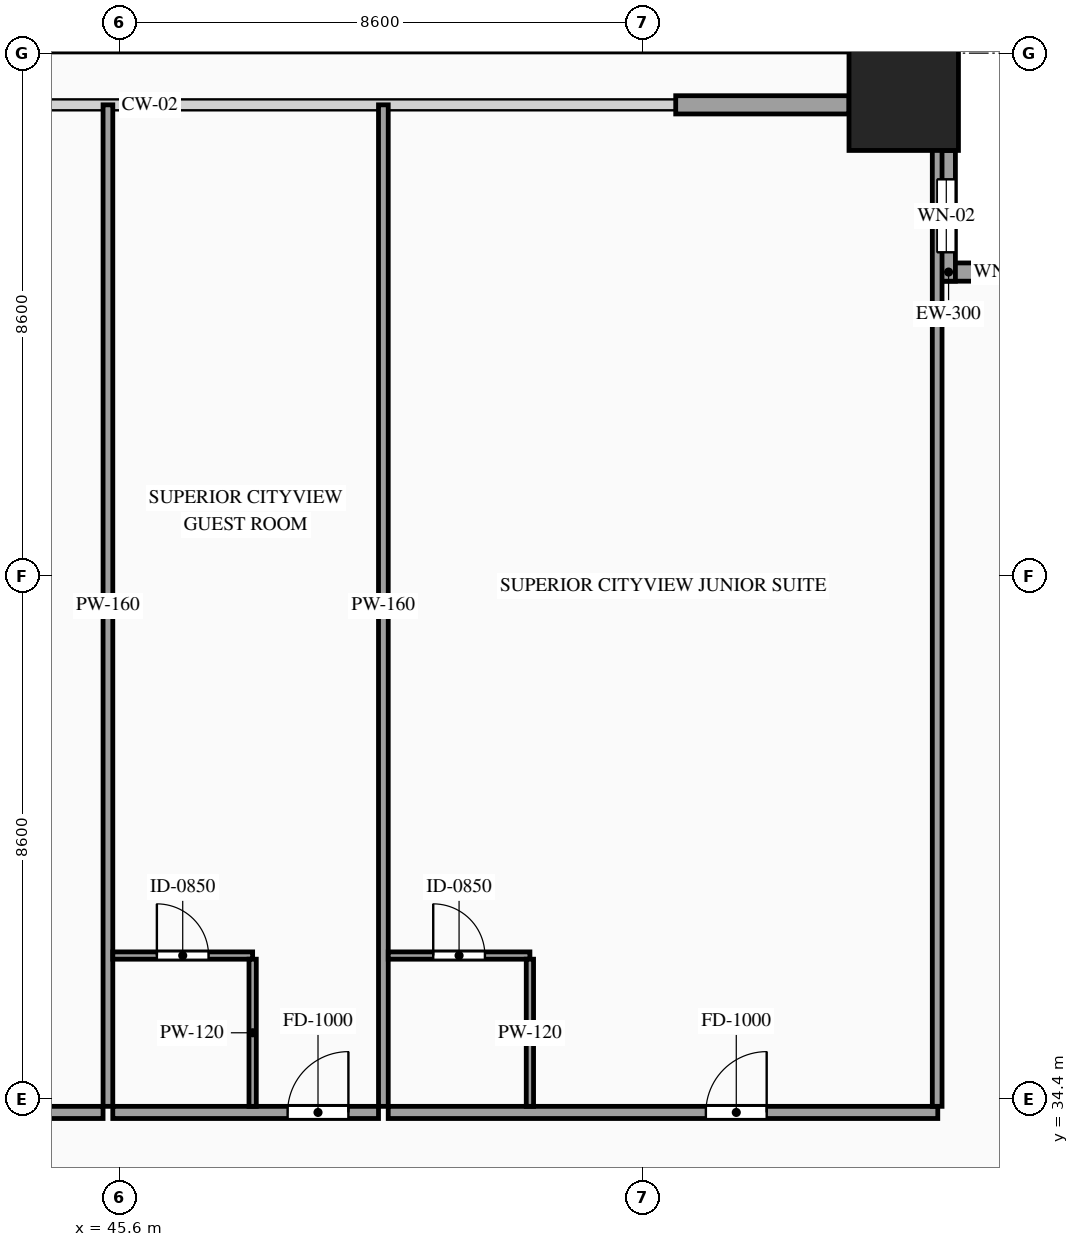
"""IFC4 building model, lengths in metres.
Left out: names, types, materials, properties, quantities, classifications, styles, units other than length and angle.
Written with IfcOpenShell. Run it as: python <this file> out.ifc"""

import sys

from ifc_helpers import new_model, si_unit, direction, frame, frame_2d, origin, origin_2d, place, context, subcontext, project, spatial, rectangle, hollow_rectangle, extrude, source, transform, mapped, element, fill, save


model = new_model("IFC4")
c1 = context("Model", 3, precision=1e-05, world=origin(), true_north=direction((0.0, 1.0)))
c2 = subcontext(c1, "Body", "Model", "MODEL_VIEW")
j1 = project(units=[si_unit("LENGTHUNIT", "METRE"), si_unit("PLANEANGLEUNIT", "RADIAN")], contexts=[c1])
p1 = place(None, origin())
s1 = spatial("IfcSite", under=j1, at=p1, CompositionType="ELEMENT")
p2 = place(p1, origin())
s2 = spatial("IfcBuilding", under=s1, at=p2, CompositionType="ELEMENT")
p3 = place(p2, frame((0.0, 0.0, 71.2)))
s3 = spatial("IfcBuildingStorey", under=s2, at=p3, CompositionType="ELEMENT", Elevation=71.2)
m1 = source(origin(), c2, "Body", "SweptSolid", [
    extrude(hollow_rectangle(XDim=1.8, YDim=1.8, WallThickness=0.08, at=origin_2d()), origin(), (0.0, 0.0, 1.0), 3.6),
])
p4 = place(p3, frame((58.5, 50.9, 0.0), z_axis=(0.0, 0.0, 1.0), x_axis=(1.0, 0.0, 0.0)))
e1 = element("IfcColumn", 1, at=p4, inside=s3, PredefinedType="COLUMN", context=c2, shape_type="MappedRepresentation", body=[
    mapped(m1, transform((0.0, 0.0, 0.0), scale=1.0)),
])
p5 = place(p3, frame((61.2, 48.0, 0.0), z_axis=(0.0, 0.0, 1.0), x_axis=(-1.0, 0.0, 0.0)))
e2 = element("IfcWall", 2, at=p5, inside=s3, PredefinedType="SOLIDWALL", context=c2, shape_type="SweptSolid", body=[
    extrude(rectangle(XDim=2.15, YDim=0.3, at=frame_2d((1.075, 0.0))), origin(), (0.0, 0.0, 1.0), 3.38),
])
p6 = place(p5, frame((0.625, 0.0, 0.85)))
e3 = element("IfcOpeningElement", 3, at=p6, cuts=e2, PredefinedType="OPENING", context=c2, shape_type="SweptSolid", body=[
    extrude(rectangle(XDim=0.9, YDim=1.5, at=frame_2d((0.45, 0.75))), frame((0.0, 0.165, 0.0), z_axis=(0.0, -1.0, 0.0), x_axis=(1.0, 0.0, 0.0)), (0.0, 0.0, 1.0), 0.33),
])
p7 = place(p3, frame((59.2, 47.85, 0.0), z_axis=(0.0, 0.0, 1.0), x_axis=(0.0, 1.0, 0.0)))
e4 = element("IfcWall", 4, at=p7, inside=s3, PredefinedType="SOLIDWALL", context=c2, shape_type="SweptSolid", body=[
    extrude(rectangle(XDim=2.15, YDim=0.3, at=frame_2d((1.075, 0.0))), origin(), (0.0, 0.0, 1.0), 3.38),
])
p8 = place(p7, frame((0.475, 0.0, 0.85)))
e5 = element("IfcOpeningElement", 5, at=p8, cuts=e4, PredefinedType="OPENING", context=c2, shape_type="SweptSolid", body=[
    extrude(rectangle(XDim=1.2, YDim=2.1, at=frame_2d((0.6, 1.05))), frame((0.0, 0.165, 0.0), z_axis=(0.0, -1.0, 0.0), x_axis=(1.0, 0.0, 0.0)), (0.0, 0.0, 1.0), 0.33),
])
m2 = source(origin(), c2, "Body", "SweptSolid", [
    extrude(rectangle(XDim=2.85, YDim=0.3, at=frame_2d((1.425, 0.0))), origin(), (0.0, 0.0, 1.0), 2.775),
])
p9 = place(p3, frame((54.75, 50.75, 0.0), z_axis=(0.0, 0.0, 1.0), x_axis=(1.0, 0.0, 0.0)))
e6 = element("IfcWall", 6, at=p9, inside=s3, PredefinedType="SOLIDWALL", context=c2, shape_type="MappedRepresentation", body=[
    mapped(m2, transform((0.0, 0.0, 0.0), scale=1.0)),
])
p10 = place(p3, frame((35.315, 34.18, 0.0), z_axis=(0.0, 0.0, 1.0), x_axis=(1.0, 0.0, 0.0)))
e7 = element("IfcWall", 7, at=p10, inside=s3, PredefinedType="PARTITIONING", context=c2, shape_type="SweptSolid", body=[
    extrude(rectangle(XDim=10.017, YDim=0.2, at=frame_2d((5.009, 0.0))), origin(), (0.0, 0.0, 1.0), 3.38),
])
p11 = place(p10, frame((5.713, 0.0, 0.0)))
e8 = element("IfcOpeningElement", 8, at=p11, cuts=e7, PredefinedType="OPENING", context=c2, shape_type="SweptSolid", body=[
    extrude(rectangle(XDim=1.0, YDim=2.2, at=frame_2d((0.5, 1.1))), frame((0.0, 0.115, 0.0), z_axis=(0.0, -1.0, 0.0), x_axis=(1.0, 0.0, 0.0)), (0.0, 0.0, 1.0), 0.23),
])
m3 = source(origin(), c2, "Body", "SweptSolid", [
    extrude(rectangle(XDim=16.47, YDim=0.16, at=frame_2d((8.235, 0.0))), origin(), (0.0, 0.0, 1.0), 3.38),
])
p12 = place(p3, frame((45.412, 34.28, 0.0), z_axis=(0.0, 0.0, 1.0), x_axis=(0.0, 1.0, 0.0)))
e9 = element("IfcWall", 9, at=p12, inside=s3, PredefinedType="PARTITIONING", context=c2, shape_type="MappedRepresentation", body=[
    mapped(m3, transform((0.0, 0.0, 0.0), scale=1.0)),
])
p13 = place(p3, frame((45.492, 34.18, 0.0), z_axis=(0.0, 0.0, 1.0), x_axis=(1.0, 0.0, 0.0)))
e10 = element("IfcWall", 10, at=p13, inside=s3, PredefinedType="PARTITIONING", context=c2, shape_type="SweptSolid", body=[
    extrude(rectangle(XDim=4.37, YDim=0.2, at=frame_2d((2.185, 0.0))), origin(), (0.0, 0.0, 1.0), 3.38),
])
p14 = place(p13, frame((2.875, 0.0, 0.0)))
e11 = element("IfcOpeningElement", 11, at=p14, cuts=e10, PredefinedType="OPENING", context=c2, shape_type="SweptSolid", body=[
    extrude(rectangle(XDim=1.0, YDim=2.2, at=frame_2d((0.5, 1.1))), frame((0.0, 0.115, 0.0), z_axis=(0.0, -1.0, 0.0), x_axis=(1.0, 0.0, 0.0)), (0.0, 0.0, 1.0), 0.23),
])
p15 = place(p3, frame((49.942, 34.28, 0.0), z_axis=(0.0, 0.0, 1.0), x_axis=(0.0, 1.0, 0.0)))
e12 = element("IfcWall", 12, at=p15, inside=s3, PredefinedType="PARTITIONING", context=c2, shape_type="MappedRepresentation", body=[
    mapped(m3, transform((0.0, 0.0, 0.0), scale=1.0)),
])
p16 = place(p3, frame((45.492, 36.76, 0.0), z_axis=(0.0, 0.0, 1.0), x_axis=(1.0, 0.0, 0.0)))
e13 = element("IfcWall", 13, at=p16, inside=s3, PredefinedType="PARTITIONING", context=c2, shape_type="SweptSolid", body=[
    extrude(rectangle(XDim=2.3, YDim=0.12, at=frame_2d((1.15, 0.0))), origin(), (0.0, 0.0, 1.0), 3.38),
])
p17 = place(p16, frame((0.725, 0.0, 0.0)))
e14 = element("IfcOpeningElement", 14, at=p17, cuts=e13, PredefinedType="OPENING", context=c2, shape_type="SweptSolid", body=[
    extrude(rectangle(XDim=0.85, YDim=2.1, at=frame_2d((0.425, 1.05))), frame((0.0, 0.075, 0.0), z_axis=(0.0, -1.0, 0.0), x_axis=(1.0, 0.0, 0.0)), (0.0, 0.0, 1.0), 0.15),
])
m4 = source(origin(), c2, "Body", "SweptSolid", [
    extrude(rectangle(XDim=2.42, YDim=0.12, at=frame_2d((1.21, 0.0))), origin(), (0.0, 0.0, 1.0), 3.38),
])
p18 = place(p3, frame((47.792, 34.28, 0.0), z_axis=(0.0, 0.0, 1.0), x_axis=(0.0, 1.0, 0.0)))
e15 = element("IfcWall", 15, at=p18, inside=s3, PredefinedType="PARTITIONING", context=c2, shape_type="MappedRepresentation", body=[
    mapped(m4, transform((0.0, 0.0, 0.0), scale=1.0)),
])
p19 = place(p3, frame((50.022, 34.18, 0.0), z_axis=(0.0, 0.0, 1.0), x_axis=(1.0, 0.0, 0.0)))
e16 = element("IfcWall", 16, at=p19, inside=s3, PredefinedType="PARTITIONING", context=c2, shape_type="SweptSolid", body=[
    extrude(rectangle(XDim=9.038, YDim=0.2, at=frame_2d((4.519, 0.0))), origin(), (0.0, 0.0, 1.0), 3.38),
])
p20 = place(p19, frame((5.224, 0.0, 0.0)))
e17 = element("IfcOpeningElement", 17, at=p20, cuts=e16, PredefinedType="OPENING", context=c2, shape_type="SweptSolid", body=[
    extrude(rectangle(XDim=1.0, YDim=2.2, at=frame_2d((0.5, 1.1))), frame((0.0, 0.115, 0.0), z_axis=(0.0, -1.0, 0.0), x_axis=(1.0, 0.0, 0.0)), (0.0, 0.0, 1.0), 0.23),
])
m5 = source(origin(), c2, "Body", "SweptSolid", [
    extrude(rectangle(XDim=16.32, YDim=0.16, at=frame_2d((8.16, 0.0))), origin(), (0.0, 0.0, 1.0), 3.38),
])
p21 = place(p3, frame((59.05, 34.28, 0.0), z_axis=(0.0, 0.0, 1.0), x_axis=(0.0, 1.0, 0.0)))
e18 = element("IfcWall", 18, at=p21, inside=s3, PredefinedType="PARTITIONING", context=c2, shape_type="MappedRepresentation", body=[
    mapped(m5, transform((0.0, 0.0, 0.0), scale=1.0)),
])
p22 = place(p3, frame((50.022, 36.76, 0.0), z_axis=(0.0, 0.0, 1.0), x_axis=(1.0, 0.0, 0.0)))
e19 = element("IfcWall", 19, at=p22, inside=s3, PredefinedType="PARTITIONING", context=c2, shape_type="SweptSolid", body=[
    extrude(rectangle(XDim=2.33, YDim=0.12, at=frame_2d((1.165, 0.0))), origin(), (0.0, 0.0, 1.0), 3.38),
])
p23 = place(p22, frame((0.74, 0.0, 0.0)))
e20 = element("IfcOpeningElement", 20, at=p23, cuts=e19, PredefinedType="OPENING", context=c2, shape_type="SweptSolid", body=[
    extrude(rectangle(XDim=0.85, YDim=2.1, at=frame_2d((0.425, 1.05))), frame((0.0, 0.075, 0.0), z_axis=(0.0, -1.0, 0.0), x_axis=(1.0, 0.0, 0.0)), (0.0, 0.0, 1.0), 0.15),
])
p24 = place(p3, frame((52.352, 34.28, 0.0), z_axis=(0.0, 0.0, 1.0), x_axis=(0.0, 1.0, 0.0)))
e21 = element("IfcWall", 21, at=p24, inside=s3, PredefinedType="PARTITIONING", context=c2, shape_type="MappedRepresentation", body=[
    mapped(m4, transform((0.0, 0.0, 0.0), scale=1.0)),
])
m6 = source(origin(), c2, "Body", "SweptSolid", [
    extrude(rectangle(XDim=0.9, YDim=1.5, at=frame_2d((0.45, 0.75))), frame((0.0, 0.03, 0.0), z_axis=(0.0, -1.0, 0.0), x_axis=(1.0, 0.0, 0.0)), (0.0, 0.0, 1.0), 0.06),
])
p25 = place(p6, origin())
e22 = element("IfcWindow", 22, at=p25, inside=s3, PartitioningType="SINGLE_PANEL", PredefinedType="WINDOW", context=c2, shape_type="MappedRepresentation", body=[
    mapped(m6, transform((0.0, 0.0, 0.0), scale=1.0)),
])
fill(e3, e22)
m7 = source(origin(), c2, "Body", "SweptSolid", [
    extrude(rectangle(XDim=1.2, YDim=2.1, at=frame_2d((0.6, 1.05))), frame((0.0, 0.03, 0.0), z_axis=(0.0, -1.0, 0.0), x_axis=(1.0, 0.0, 0.0)), (0.0, 0.0, 1.0), 0.06),
])
p26 = place(p8, origin())
e23 = element("IfcWindow", 23, at=p26, inside=s3, PartitioningType="SINGLE_PANEL", PredefinedType="WINDOW", context=c2, shape_type="MappedRepresentation", body=[
    mapped(m7, transform((0.0, 0.0, 0.0), scale=1.0)),
])
fill(e5, e23)
m8 = source(origin(), c2, "Body", "SweptSolid", [
    extrude(rectangle(XDim=1.0, YDim=2.2, at=frame_2d((0.5, 1.1))), frame((0.0, 0.025, 0.0), z_axis=(0.0, -1.0, 0.0), x_axis=(1.0, 0.0, 0.0)), (0.0, 0.0, 1.0), 0.05),
])
p27 = place(p14, origin())
e24 = element("IfcDoor", 24, at=p27, inside=s3, OperationType="SINGLE_SWING_RIGHT", PredefinedType="DOOR", context=c2, shape_type="MappedRepresentation", body=[
    mapped(m8, transform((0.0, 0.0, 0.0), scale=1.0)),
])
fill(e11, e24)
m9 = source(origin(), c2, "Body", "SweptSolid", [
    extrude(rectangle(XDim=0.85, YDim=2.1, at=frame_2d((0.425, 1.05))), frame((0.0, 0.025, 0.0), z_axis=(0.0, -1.0, 0.0), x_axis=(1.0, 0.0, 0.0)), (0.0, 0.0, 1.0), 0.05),
])
p28 = place(p17, origin())
e25 = element("IfcDoor", 25, at=p28, inside=s3, OperationType="SINGLE_SWING_LEFT", PredefinedType="DOOR", context=c2, shape_type="MappedRepresentation", body=[
    mapped(m9, transform((0.0, 0.0, 0.0), scale=1.0)),
])
fill(e14, e25)
p29 = place(p20, origin())
e26 = element("IfcDoor", 26, at=p29, inside=s3, OperationType="SINGLE_SWING_RIGHT", PredefinedType="DOOR", context=c2, shape_type="MappedRepresentation", body=[
    mapped(m8, transform((0.0, 0.0, 0.0), scale=1.0)),
])
fill(e17, e26)
p30 = place(p23, origin())
e27 = element("IfcDoor", 27, at=p30, inside=s3, OperationType="SINGLE_SWING_LEFT", PredefinedType="DOOR", context=c2, shape_type="MappedRepresentation", body=[
    mapped(m9, transform((0.0, 0.0, 0.0), scale=1.0)),
])
fill(e20, e27)
save(model, sys.argv[1])
